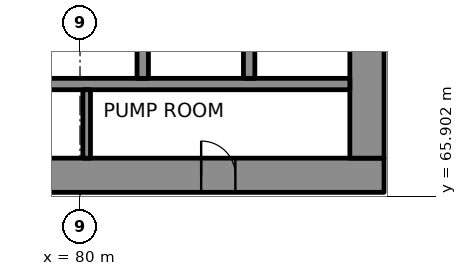
"""IFC4 building model, lengths in metres.
Left out: names, types, materials, properties, quantities, classifications, styles, units other than length and angle.
Written with IfcOpenShell. Run it as: python <this file> out.ifc"""

import sys

from ifc_helpers import new_model, si_unit, direction, frame, frame_2d, origin, place, context, subcontext, project, spatial, rectangle, extrude, element, fill, save


model = new_model("IFC4")
c1 = context("Model", 3, precision=1e-05, world=origin(), true_north=direction((0.0, 1.0)))
c2 = subcontext(c1, "Body", "Model", "MODEL_VIEW")
j1 = project(units=[si_unit("LENGTHUNIT", "METRE"), si_unit("PLANEANGLEUNIT", "RADIAN")], contexts=[c1])
p1 = place(None, origin())
s1 = spatial("IfcSite", under=j1, at=p1, CompositionType="ELEMENT")
p2 = place(p1, origin())
s2 = spatial("IfcBuilding", under=s1, at=p2, CompositionType="ELEMENT")
p3 = place(p2, frame((0.0, 0.0, 12.6)))
s3 = spatial("IfcBuildingStorey", under=s2, at=p3, CompositionType="ELEMENT", Elevation=12.6)
p4 = place(p3, frame((62.0, 66.45, 0.0), z_axis=(0.0, 0.0, 1.0), x_axis=(1.0, 0.0, 0.0)))
e1 = element("IfcWall", 1, at=p4, inside=s3, PredefinedType="SHEAR", context=c2, shape_type="SweptSolid", body=[
    extrude(rectangle(XDim=26.0, YDim=0.9, at=frame_2d((13.0, 0.0))), origin(), (0.0, 0.0, 1.0), 4.3),
])
p5 = place(p4, frame((3.45, 0.0, 0.0)))
e2 = element("IfcOpeningElement", 2, at=p5, cuts=e1, PredefinedType="OPENING", context=c2, shape_type="SweptSolid", body=[
    extrude(rectangle(XDim=0.9, YDim=2.1, at=frame_2d((0.45, 1.05))), frame((0.0, 0.46, 0.0), z_axis=(0.0, -1.0, 0.0), x_axis=(1.0, 0.0, 0.0)), (0.0, 0.0, 1.0), 0.92),
])
p6 = place(p4, frame((6.425, 0.0, 0.0)))
e3 = element("IfcOpeningElement", 3, at=p6, cuts=e1, PredefinedType="OPENING", context=c2, shape_type="SweptSolid", body=[
    extrude(rectangle(XDim=0.9, YDim=2.1, at=frame_2d((0.45, 1.05))), frame((0.0, 0.46, 0.0), z_axis=(0.0, -1.0, 0.0), x_axis=(1.0, 0.0, 0.0)), (0.0, 0.0, 1.0), 0.92),
])
p7 = place(p4, frame((9.4, 0.0, 0.0)))
e4 = element("IfcOpeningElement", 4, at=p7, cuts=e1, PredefinedType="OPENING", context=c2, shape_type="SweptSolid", body=[
    extrude(rectangle(XDim=0.9, YDim=2.1, at=frame_2d((0.45, 1.05))), frame((0.0, 0.46, 0.0), z_axis=(0.0, -1.0, 0.0), x_axis=(1.0, 0.0, 0.0)), (0.0, 0.0, 1.0), 0.92),
])
p8 = place(p4, frame((14.262, 0.0, 0.0)))
e5 = element("IfcOpeningElement", 5, at=p8, cuts=e1, PredefinedType="OPENING", context=c2, shape_type="SweptSolid", body=[
    extrude(rectangle(XDim=0.9, YDim=2.1, at=frame_2d((0.45, 1.05))), frame((0.0, 0.46, 0.0), z_axis=(0.0, -1.0, 0.0), x_axis=(1.0, 0.0, 0.0)), (0.0, 0.0, 1.0), 0.92),
])
p9 = place(p4, frame((21.188, 0.0, 0.0)))
e6 = element("IfcOpeningElement", 6, at=p9, cuts=e1, PredefinedType="OPENING", context=c2, shape_type="SweptSolid", body=[
    extrude(rectangle(XDim=0.9, YDim=2.1, at=frame_2d((0.45, 1.05))), frame((0.0, 0.46, 0.0), z_axis=(0.0, -1.0, 0.0), x_axis=(1.0, 0.0, 0.0)), (0.0, 0.0, 1.0), 0.92),
])
p10 = place(p3, frame((87.55, 66.9, 0.0), z_axis=(0.0, 0.0, 1.0), x_axis=(0.0, 1.0, 0.0)))
e7 = element("IfcWall", 7, at=p10, inside=s3, PredefinedType="SHEAR", context=c2, shape_type="SweptSolid", body=[
    extrude(rectangle(XDim=16.2, YDim=0.9, at=frame_2d((8.1, 0.0))), origin(), (0.0, 0.0, 1.0), 4.3),
])
p11 = place(p10, frame((5.5, 0.0, 0.0)))
e8 = element("IfcOpeningElement", 8, at=p11, cuts=e7, PredefinedType="OPENING", context=c2, shape_type="SweptSolid", body=[
    extrude(rectangle(XDim=1.8, YDim=2.1, at=frame_2d((0.9, 1.05))), frame((0.0, 0.46, 0.0), z_axis=(0.0, -1.0, 0.0), x_axis=(1.0, 0.0, 0.0)), (0.0, 0.0, 1.0), 0.92),
])
p12 = place(p10, frame((11.738, 0.0, 0.0)))
e9 = element("IfcOpeningElement", 9, at=p12, cuts=e7, PredefinedType="OPENING", context=c2, shape_type="SweptSolid", body=[
    extrude(rectangle(XDim=0.9, YDim=2.1, at=frame_2d((0.45, 1.05))), frame((0.0, 0.46, 0.0), z_axis=(0.0, -1.0, 0.0), x_axis=(1.0, 0.0, 0.0)), (0.0, 0.0, 1.0), 0.92),
])
p13 = place(p3, frame((70.35, 68.85, 0.0), z_axis=(0.0, 0.0, 1.0), x_axis=(1.0, 0.0, 0.0)))
e10 = element("IfcWall", 10, at=p13, inside=s3, PredefinedType="SHEAR", context=c2, shape_type="SweptSolid", body=[
    extrude(rectangle(XDim=16.75, YDim=0.3, at=frame_2d((8.375, 0.0))), origin(), (0.0, 0.0, 1.0), 4.3),
])
for number, where, z_axis, x_axis in (
    (11, (81.65, 69.0, 0.0), (0.0, 0.0, 1.0), (0.0, 1.0, 0.0)),
    (12, (84.45, 69.0, 0.0), (0.0, 0.0, 1.0), (0.0, 1.0, 0.0)),
):
    element("IfcWall", number, at=place(p3, frame(where, z_axis=z_axis, x_axis=x_axis)), inside=s3, PredefinedType="SHEAR", context=c2, shape_type="SweptSolid", body=[
        extrude(rectangle(XDim=2.6, YDim=0.3, at=frame_2d((1.3, 0.0))), origin(), (0.0, 0.0, 1.0), 4.3),
    ])
p14 = place(p3, frame((80.175, 66.9, 0.0), z_axis=(0.0, 0.0, 1.0), x_axis=(0.0, 1.0, 0.0)))
e13 = element("IfcWall", 13, at=p14, inside=s3, PredefinedType="PARTITIONING", context=c2, shape_type="SweptSolid", body=[
    extrude(rectangle(XDim=1.8, YDim=0.2, at=frame_2d((0.9, 0.0))), origin(), (0.0, 0.0, 1.0), 4.3),
])
p15 = place(p3, frame((107.106, 62.36, 0.0), z_axis=(0.0, 0.0, 1.0), x_axis=(-0.49999992739, 0.866025445706, 0.0)))
e14 = element("IfcWall", 14, at=p15, inside=s3, PredefinedType="SOLIDWALL", context=c2, shape_type="SweptSolid", body=[
    extrude(rectangle(XDim=54.0, YDim=0.4, at=frame_2d((27.0, 0.0))), origin(), (0.0, 0.0, 1.0), 4.24),
])
p16 = place(p3, frame((112.496, 65.725, 0.0), z_axis=(0.0, 0.0, 1.0), x_axis=(-0.499998673217, 0.866026169802, 0.0)))
e15 = element("IfcWall", 15, at=p16, inside=s3, PredefinedType="PARTITIONING", context=c2, shape_type="SweptSolid", body=[
    extrude(rectangle(XDim=53.48, YDim=0.2, at=frame_2d((26.74, 0.0))), origin(), (0.0, 0.0, 1.0), 4.24),
])
p17 = place(p16, frame((13.08, 0.0, 0.0)))
e16 = element("IfcOpeningElement", 16, at=p17, cuts=e15, PredefinedType="OPENING", context=c2, shape_type="SweptSolid", body=[
    extrude(rectangle(XDim=1.0, YDim=2.1, at=frame_2d((0.5, 1.05))), frame((0.0, 0.11, 0.0), z_axis=(0.0, -1.0, 0.0), x_axis=(1.0, 0.0, 0.0)), (0.0, 0.0, 1.0), 0.22),
])
p18 = place(p16, frame((26.28, 0.0, 0.0)))
e17 = element("IfcOpeningElement", 17, at=p18, cuts=e15, PredefinedType="OPENING", context=c2, shape_type="SweptSolid", body=[
    extrude(rectangle(XDim=1.0, YDim=2.1, at=frame_2d((0.5, 1.05))), frame((0.0, 0.11, 0.0), z_axis=(0.0, -1.0, 0.0), x_axis=(1.0, 0.0, 0.0)), (0.0, 0.0, 1.0), 0.22),
])
p19 = place(p16, frame((43.88, 0.0, 0.0)))
e18 = element("IfcOpeningElement", 18, at=p19, cuts=e15, PredefinedType="OPENING", context=c2, shape_type="SweptSolid", body=[
    extrude(rectangle(XDim=1.0, YDim=2.1, at=frame_2d((0.5, 1.05))), frame((0.0, 0.11, 0.0), z_axis=(0.0, -1.0, 0.0), x_axis=(1.0, 0.0, 0.0)), (0.0, 0.0, 1.0), 0.22),
])
p20 = place(p16, frame((50.58, 0.0, 0.0)))
e19 = element("IfcOpeningElement", 19, at=p20, cuts=e15, PredefinedType="OPENING", context=c2, shape_type="SweptSolid", body=[
    extrude(rectangle(XDim=1.0, YDim=2.1, at=frame_2d((0.5, 1.05))), frame((0.0, 0.11, 0.0), z_axis=(0.0, -1.0, 0.0), x_axis=(1.0, 0.0, 0.0)), (0.0, 0.0, 1.0), 0.22),
])
p21 = place(p9, origin())
e20 = element("IfcDoor", 20, at=p21, inside=s3, OperationType="SINGLE_SWING_LEFT", PredefinedType="DOOR", context=c2, shape_type="SweptSolid", body=[
    extrude(rectangle(XDim=0.9, YDim=2.1, at=frame_2d((0.45, 1.05))), frame((0.0, 0.17, 0.0), z_axis=(0.0, -1.0, 0.0), x_axis=(1.0, 0.0, 0.0)), (0.0, 0.0, 1.0), 0.34),
])
fill(e6, e20)
save(model, sys.argv[1])
